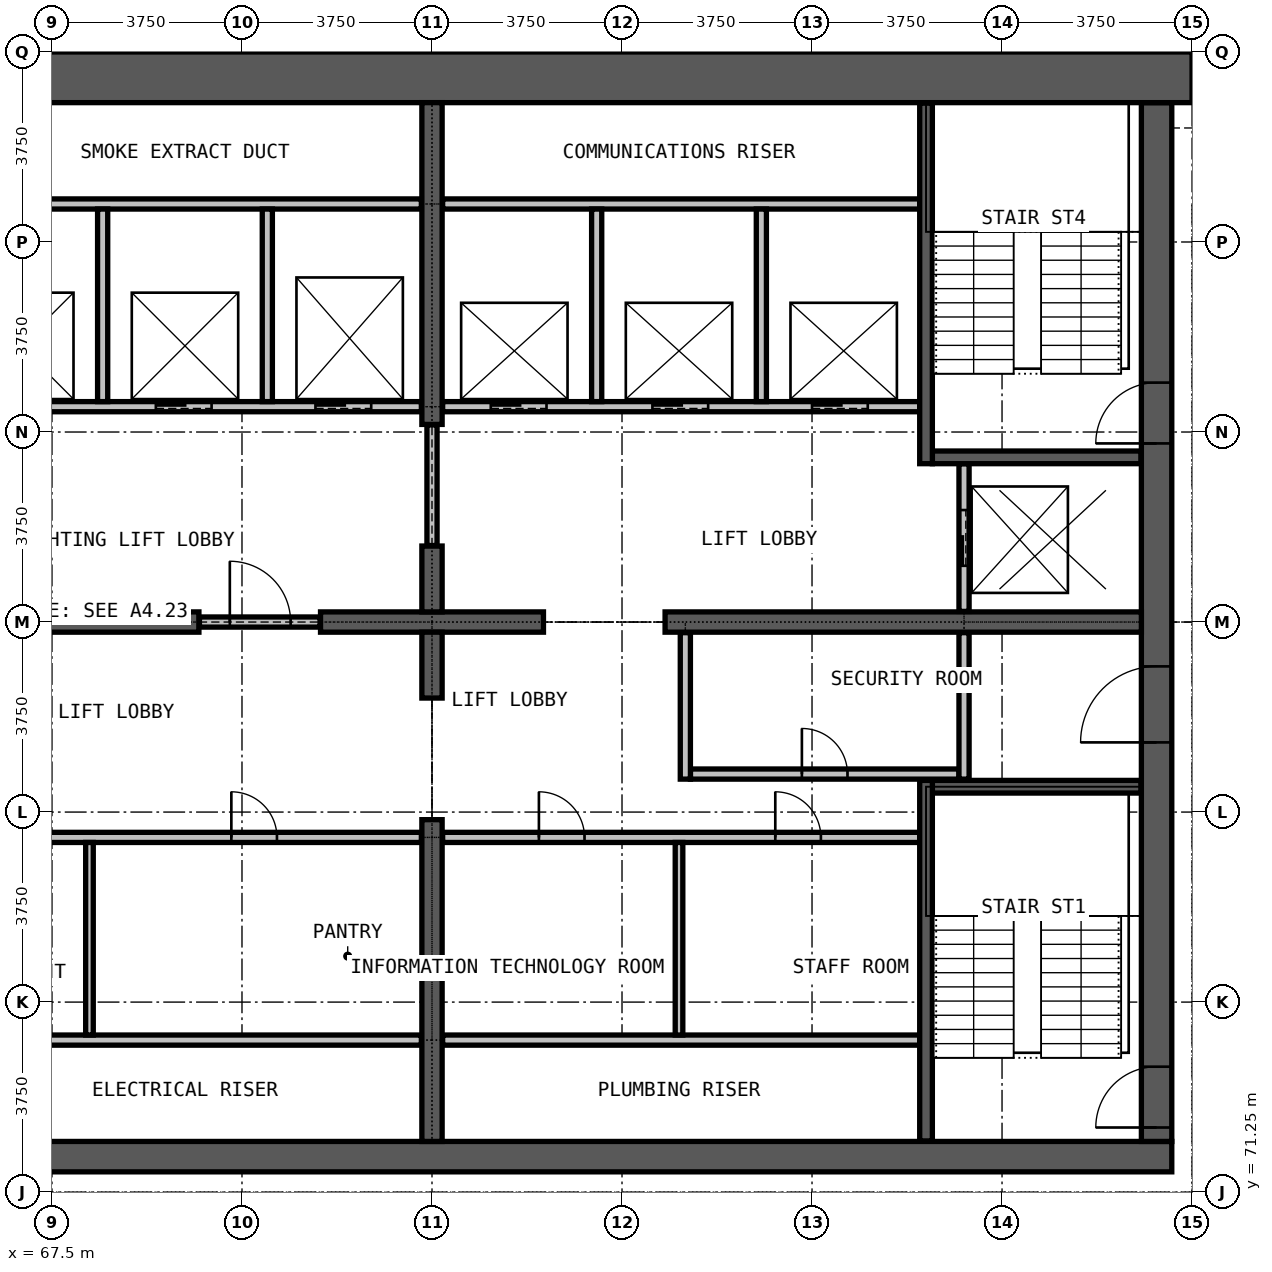
"""IFC4 building model, lengths in metres.
Left out: names, types, materials, properties, quantities, classifications, styles, units other than length and angle.
Written with IfcOpenShell. Run it as: python <this file> out.ifc"""

import sys

from ifc_helpers import new_model, si_unit, direction, frame, frame_2d, origin, place, context, subcontext, project, spatial, rectangle, extrude, element, fill, save


model = new_model("IFC4")
c1 = context("Model", 3, precision=1e-05, world=origin(), true_north=direction((0.0, 1.0)))
c2 = subcontext(c1, "Body", "Model", "MODEL_VIEW")
j1 = project(units=[si_unit("LENGTHUNIT", "METRE"), si_unit("PLANEANGLEUNIT", "RADIAN")], contexts=[c1])
p1 = place(None, origin())
s1 = spatial("IfcSite", under=j1, at=p1, CompositionType="ELEMENT")
p2 = place(p1, origin())
s2 = spatial("IfcBuilding", under=s1, at=p2, CompositionType="ELEMENT")
p3 = place(p2, frame((0.0, 0.0, 249.9)))
s3 = spatial("IfcBuildingStorey", under=s2, at=p3, CompositionType="ELEMENT", Elevation=249.9)
p4 = place(p3, frame((60.4, 71.95, 0.0), z_axis=(0.0, 0.0, 1.0), x_axis=(1.0, 0.0, 0.0)))
e1 = element("IfcWall", 1, at=p4, inside=s3, PredefinedType="SHEAR", context=c2, shape_type="SweptSolid", body=[
    extrude(rectangle(XDim=29.2, YDim=0.6, at=frame_2d((14.6, 0.0))), origin(), (0.0, 0.0, 1.0), 3.6),
])
p5 = place(p3, frame((89.3, 72.25, 0.0), z_axis=(0.0, 0.0, 1.0), x_axis=(0.0, 1.0, 0.0)))
e2 = element("IfcWall", 2, at=p5, inside=s3, PredefinedType="SHEAR", context=c2, shape_type="SweptSolid", body=[
    extrude(rectangle(XDim=20.5, YDim=0.6, at=frame_2d((10.25, 0.0))), origin(), (0.0, 0.0, 1.0), 3.6),
])
p6 = place(p5, frame((0.275, 0.0, 0.0)))
e3 = element("IfcOpeningElement", 3, at=p6, cuts=e2, PredefinedType="OPENING", context=c2, shape_type="SweptSolid", body=[
    extrude(rectangle(XDim=1.2, YDim=2.2, at=frame_2d((0.6, 1.1))), frame((0.0, 0.31, 0.0), z_axis=(0.0, -1.0, 0.0), x_axis=(1.0, 0.0, 0.0)), (0.0, 0.0, 1.0), 0.62),
])
p7 = place(p5, frame((13.775, 0.0, 0.0)))
e4 = element("IfcOpeningElement", 4, at=p7, cuts=e2, PredefinedType="OPENING", context=c2, shape_type="SweptSolid", body=[
    extrude(rectangle(XDim=1.2, YDim=2.2, at=frame_2d((0.6, 1.1))), frame((0.0, 0.31, 0.0), z_axis=(0.0, -1.0, 0.0), x_axis=(1.0, 0.0, 0.0)), (0.0, 0.0, 1.0), 0.62),
])
p8 = place(p5, frame((7.875, 0.0, 0.0)))
e5 = element("IfcOpeningElement", 5, at=p8, cuts=e2, PredefinedType="OPENING", context=c2, shape_type="SweptSolid", body=[
    extrude(rectangle(XDim=1.5, YDim=2.2, at=frame_2d((0.75, 1.1))), frame((0.0, 0.31, 0.0), z_axis=(0.0, -1.0, 0.0), x_axis=(1.0, 0.0, 0.0)), (0.0, 0.0, 1.0), 0.62),
])
p9 = place(p3, frame((90.0, 93.25, 0.0), z_axis=(0.0, 0.0, 1.0), x_axis=(-1.0, 0.0, 0.0)))
e6 = element("IfcWall", 6, at=p9, inside=s3, PredefinedType="SHEAR", context=c2, shape_type="SweptSolid", body=[
    extrude(rectangle(XDim=30.0, YDim=1.0, at=frame_2d((15.0, 0.0))), origin(), (0.0, 0.0, 1.0), 3.6),
])
p10 = place(p3, frame((61.0, 82.5, 0.0), z_axis=(0.0, 0.0, 1.0), x_axis=(1.0, 0.0, 0.0)))
e7 = element("IfcWall", 7, at=p10, inside=s3, PredefinedType="SHEAR", context=c2, shape_type="SweptSolid", body=[
    extrude(rectangle(XDim=9.4, YDim=0.4, at=frame_2d((4.7, 0.0))), origin(), (0.0, 0.0, 1.0), 3.6),
])
p11 = place(p3, frame((72.8, 82.5, 0.0), z_axis=(0.0, 0.0, 1.0), x_axis=(1.0, 0.0, 0.0)))
e8 = element("IfcWall", 8, at=p11, inside=s3, PredefinedType="SHEAR", context=c2, shape_type="SweptSolid", body=[
    extrude(rectangle(XDim=4.4, YDim=0.4, at=frame_2d((2.2, 0.0))), origin(), (0.0, 0.0, 1.0), 3.6),
])
p12 = place(p3, frame((79.6, 82.5, 0.0), z_axis=(0.0, 0.0, 1.0), x_axis=(1.0, 0.0, 0.0)))
e9 = element("IfcWall", 9, at=p12, inside=s3, PredefinedType="SHEAR", context=c2, shape_type="SweptSolid", body=[
    extrude(rectangle(XDim=9.4, YDim=0.4, at=frame_2d((4.7, 0.0))), origin(), (0.0, 0.0, 1.0), 3.6),
])
p13 = place(p3, frame((75.0, 72.25, 0.0), z_axis=(0.0, 0.0, 1.0), x_axis=(0.0, 1.0, 0.0)))
e10 = element("IfcWall", 10, at=p13, inside=s3, PredefinedType="SHEAR", context=c2, shape_type="SweptSolid", body=[
    extrude(rectangle(XDim=6.35, YDim=0.4, at=frame_2d((3.175, 0.0))), origin(), (0.0, 0.0, 1.0), 3.6),
])
for number, where, z_axis, x_axis in (
    (11, (75.0, 81.0, 0.0), (0.0, 0.0, 1.0), (0.0, 1.0, 0.0)),
    (12, (75.0, 82.7, 0.0), (0.0, 0.0, 1.0), (0.0, 1.0, 0.0)),
):
    element("IfcWall", number, at=place(p3, frame(where, z_axis=z_axis, x_axis=x_axis)), inside=s3, PredefinedType="SHEAR", context=c2, shape_type="SweptSolid", body=[
        extrude(rectangle(XDim=1.3, YDim=0.4, at=frame_2d((0.65, 0.0))), origin(), (0.0, 0.0, 1.0), 3.6),
    ])
p14 = place(p3, frame((75.0, 86.4, 0.0), z_axis=(0.0, 0.0, 1.0), x_axis=(0.0, 1.0, 0.0)))
e13 = element("IfcWall", 13, at=p14, inside=s3, PredefinedType="SHEAR", context=c2, shape_type="SweptSolid", body=[
    extrude(rectangle(XDim=6.35, YDim=0.4, at=frame_2d((3.175, 0.0))), origin(), (0.0, 0.0, 1.0), 3.6),
])
for number, where, z_axis, x_axis in (
    (14, (65.375, 74.25, 0.0), (0.0, 0.0, 1.0), (1.0, 0.0, 0.0)),
    (15, (75.21, 74.25, 0.0), (0.0, 0.0, 1.0), (1.0, 0.0, 0.0)),
):
    element("IfcWall", number, at=place(p3, frame(where, z_axis=z_axis, x_axis=x_axis)), inside=s3, PredefinedType="PARTITIONING", context=c2, shape_type="SweptSolid", body=[
        extrude(rectangle(XDim=9.415, YDim=0.2, at=frame_2d((4.708, 0.0))), origin(), (0.0, 0.0, 1.0), 3.25),
    ])
p15 = place(p3, frame((65.375, 78.25, 0.0), z_axis=(0.0, 0.0, 1.0), x_axis=(1.0, 0.0, 0.0)))
e16 = element("IfcWall", 16, at=p15, inside=s3, PredefinedType="PARTITIONING", context=c2, shape_type="SweptSolid", body=[
    extrude(rectangle(XDim=9.415, YDim=0.2, at=frame_2d((4.708, 0.0))), origin(), (0.0, 0.0, 1.0), 3.25),
])
p16 = place(p15, frame((1.0, 0.0, 0.0)))
e17 = element("IfcOpeningElement", 17, at=p16, cuts=e16, PredefinedType="OPENING", context=c2, shape_type="SweptSolid", body=[
    extrude(rectangle(XDim=0.9, YDim=2.2, at=frame_2d((0.45, 1.1))), frame((0.0, 0.11, 0.0), z_axis=(0.0, -1.0, 0.0), x_axis=(1.0, 0.0, 0.0)), (0.0, 0.0, 1.0), 0.22),
])
p17 = place(p15, frame((5.665, 0.0, 0.0)))
e18 = element("IfcOpeningElement", 18, at=p17, cuts=e16, PredefinedType="OPENING", context=c2, shape_type="SweptSolid", body=[
    extrude(rectangle(XDim=0.9, YDim=2.2, at=frame_2d((0.45, 1.1))), frame((0.0, 0.11, 0.0), z_axis=(0.0, -1.0, 0.0), x_axis=(1.0, 0.0, 0.0)), (0.0, 0.0, 1.0), 0.22),
])
p18 = place(p3, frame((75.21, 78.25, 0.0), z_axis=(0.0, 0.0, 1.0), x_axis=(1.0, 0.0, 0.0)))
e19 = element("IfcWall", 19, at=p18, inside=s3, PredefinedType="PARTITIONING", context=c2, shape_type="SweptSolid", body=[
    extrude(rectangle(XDim=9.415, YDim=0.2, at=frame_2d((4.708, 0.0))), origin(), (0.0, 0.0, 1.0), 3.25),
])
p19 = place(p18, frame((1.9, 0.0, 0.0)))
e20 = element("IfcOpeningElement", 20, at=p19, cuts=e19, PredefinedType="OPENING", context=c2, shape_type="SweptSolid", body=[
    extrude(rectangle(XDim=0.9, YDim=2.2, at=frame_2d((0.45, 1.1))), frame((0.0, 0.11, 0.0), z_axis=(0.0, -1.0, 0.0), x_axis=(1.0, 0.0, 0.0)), (0.0, 0.0, 1.0), 0.22),
])
p20 = place(p18, frame((6.565, 0.0, 0.0)))
e21 = element("IfcOpeningElement", 21, at=p20, cuts=e19, PredefinedType="OPENING", context=c2, shape_type="SweptSolid", body=[
    extrude(rectangle(XDim=0.9, YDim=2.2, at=frame_2d((0.45, 1.1))), frame((0.0, 0.11, 0.0), z_axis=(0.0, -1.0, 0.0), x_axis=(1.0, 0.0, 0.0)), (0.0, 0.0, 1.0), 0.22),
])
p21 = place(p3, frame((80.1, 79.5, 0.0), z_axis=(0.0, 0.0, 1.0), x_axis=(1.0, 0.0, 0.0)))
e22 = element("IfcWall", 22, at=p21, inside=s3, PredefinedType="PARTITIONING", context=c2, shape_type="SweptSolid", body=[
    extrude(rectangle(XDim=5.3, YDim=0.2, at=frame_2d((2.65, 0.0))), origin(), (0.0, 0.0, 1.0), 3.25),
])
p22 = place(p21, frame((2.2, 0.0, 0.0)))
e23 = element("IfcOpeningElement", 23, at=p22, cuts=e22, PredefinedType="OPENING", context=c2, shape_type="SweptSolid", body=[
    extrude(rectangle(XDim=0.9, YDim=2.2, at=frame_2d((0.45, 1.1))), frame((0.0, 0.11, 0.0), z_axis=(0.0, -1.0, 0.0), x_axis=(1.0, 0.0, 0.0)), (0.0, 0.0, 1.0), 0.22),
])
p23 = place(p3, frame((70.41, 82.5, 0.0), z_axis=(0.0, 0.0, 1.0), x_axis=(1.0, 0.0, 0.0)))
e24 = element("IfcWall", 24, at=p23, inside=s3, PredefinedType="PARTITIONING", context=c2, shape_type="SweptSolid", body=[
    extrude(rectangle(XDim=2.38, YDim=0.2, at=frame_2d((1.19, 0.0))), origin(), (0.0, 0.0, 1.0), 2.4),
])
p24 = place(p23, frame((0.6, 0.0, 0.0)))
e25 = element("IfcOpeningElement", 25, at=p24, cuts=e24, PredefinedType="OPENING", context=c2, shape_type="SweptSolid", body=[
    extrude(rectangle(XDim=1.2, YDim=2.2, at=frame_2d((0.6, 1.1))), frame((0.0, 0.11, 0.0), z_axis=(0.0, -1.0, 0.0), x_axis=(1.0, 0.0, 0.0)), (0.0, 0.0, 1.0), 0.22),
])
p25 = place(p3, frame((75.0, 84.01, 0.0), z_axis=(0.0, 0.0, 1.0), x_axis=(0.0, 1.0, 0.0)))
e26 = element("IfcWall", 26, at=p25, inside=s3, PredefinedType="PARTITIONING", context=c2, shape_type="SweptSolid", body=[
    extrude(rectangle(XDim=2.38, YDim=0.2, at=frame_2d((1.19, 0.0))), origin(), (0.0, 0.0, 1.0), 2.4),
])
for number, where, z_axis, x_axis in (
    (27, (80.0, 79.4, 0.0), (0.0, 0.0, 1.0), (0.0, 1.0, 0.0)),
    (28, (85.5, 79.4, 0.0), (0.0, 0.0, 1.0), (0.0, 1.0, 0.0)),
):
    element("IfcWall", number, at=place(p3, frame(where, z_axis=z_axis, x_axis=x_axis)), inside=s3, PredefinedType="PARTITIONING", context=c2, shape_type="SweptSolid", body=[
        extrude(rectangle(XDim=2.89, YDim=0.2, at=frame_2d((1.445, 0.0))), origin(), (0.0, 0.0, 1.0), 3.25),
    ])
for number, where, z_axis, x_axis in (
    (29, (68.24, 74.35, 0.0), (0.0, 0.0, 1.0), (0.0, 1.0, 0.0)),
    (30, (79.875, 74.35, 0.0), (0.0, 0.0, 1.0), (0.0, 1.0, 0.0)),
):
    element("IfcWall", number, at=place(p3, frame(where, z_axis=z_axis, x_axis=x_axis)), inside=s3, PredefinedType="PARTITIONING", context=c2, shape_type="SweptSolid", body=[
        extrude(rectangle(XDim=3.8, YDim=0.15, at=frame_2d((1.9, 0.0))), origin(), (0.0, 0.0, 1.0), 3.25),
    ])
p26 = place(p3, frame((65.375, 86.75, 0.0), z_axis=(0.0, 0.0, 1.0), x_axis=(1.0, 0.0, 0.0)))
e31 = element("IfcWall", 31, at=p26, inside=s3, PredefinedType="PARTITIONING", context=c2, shape_type="SweptSolid", body=[
    extrude(rectangle(XDim=9.415, YDim=0.2, at=frame_2d((4.708, 0.0))), origin(), (0.0, 0.0, 1.0), 3.25),
])
p27 = place(p26, frame((1.0, 0.0, 0.0)))
e32 = element("IfcOpeningElement", 32, at=p27, cuts=e31, PredefinedType="OPENING", context=c2, shape_type="SweptSolid", body=[
    extrude(rectangle(XDim=1.1, YDim=2.2, at=frame_2d((0.55, 1.1))), frame((0.0, 0.11, 0.0), z_axis=(0.0, -1.0, 0.0), x_axis=(1.0, 0.0, 0.0)), (0.0, 0.0, 1.0), 0.22),
])
p28 = place(p26, frame((4.175, 0.0, 0.0)))
e33 = element("IfcOpeningElement", 33, at=p28, cuts=e31, PredefinedType="OPENING", context=c2, shape_type="SweptSolid", body=[
    extrude(rectangle(XDim=1.1, YDim=2.2, at=frame_2d((0.55, 1.1))), frame((0.0, 0.11, 0.0), z_axis=(0.0, -1.0, 0.0), x_axis=(1.0, 0.0, 0.0)), (0.0, 0.0, 1.0), 0.22),
])
p29 = place(p26, frame((7.325, 0.0, 0.0)))
e34 = element("IfcOpeningElement", 34, at=p29, cuts=e31, PredefinedType="OPENING", context=c2, shape_type="SweptSolid", body=[
    extrude(rectangle(XDim=1.1, YDim=2.2, at=frame_2d((0.55, 1.1))), frame((0.0, 0.11, 0.0), z_axis=(0.0, -1.0, 0.0), x_axis=(1.0, 0.0, 0.0)), (0.0, 0.0, 1.0), 0.22),
])
p30 = place(p3, frame((75.21, 86.75, 0.0), z_axis=(0.0, 0.0, 1.0), x_axis=(1.0, 0.0, 0.0)))
e35 = element("IfcWall", 35, at=p30, inside=s3, PredefinedType="PARTITIONING", context=c2, shape_type="SweptSolid", body=[
    extrude(rectangle(XDim=9.415, YDim=0.2, at=frame_2d((4.708, 0.0))), origin(), (0.0, 0.0, 1.0), 3.25),
])
p31 = place(p30, frame((0.95, 0.0, 0.0)))
e36 = element("IfcOpeningElement", 36, at=p31, cuts=e35, PredefinedType="OPENING", context=c2, shape_type="SweptSolid", body=[
    extrude(rectangle(XDim=1.1, YDim=2.2, at=frame_2d((0.55, 1.1))), frame((0.0, 0.11, 0.0), z_axis=(0.0, -1.0, 0.0), x_axis=(1.0, 0.0, 0.0)), (0.0, 0.0, 1.0), 0.22),
])
p32 = place(p30, frame((4.14, 0.0, 0.0)))
e37 = element("IfcOpeningElement", 37, at=p32, cuts=e35, PredefinedType="OPENING", context=c2, shape_type="SweptSolid", body=[
    extrude(rectangle(XDim=1.1, YDim=2.2, at=frame_2d((0.55, 1.1))), frame((0.0, 0.11, 0.0), z_axis=(0.0, -1.0, 0.0), x_axis=(1.0, 0.0, 0.0)), (0.0, 0.0, 1.0), 0.22),
])
p33 = place(p30, frame((7.29, 0.0, 0.0)))
e38 = element("IfcOpeningElement", 38, at=p33, cuts=e35, PredefinedType="OPENING", context=c2, shape_type="SweptSolid", body=[
    extrude(rectangle(XDim=1.1, YDim=2.2, at=frame_2d((0.55, 1.1))), frame((0.0, 0.11, 0.0), z_axis=(0.0, -1.0, 0.0), x_axis=(1.0, 0.0, 0.0)), (0.0, 0.0, 1.0), 0.22),
])
for number, where, z_axis, x_axis in (
    (39, (65.375, 90.75, 0.0), (0.0, 0.0, 1.0), (1.0, 0.0, 0.0)),
    (40, (75.21, 90.75, 0.0), (0.0, 0.0, 1.0), (1.0, 0.0, 0.0)),
):
    element("IfcWall", number, at=place(p3, frame(where, z_axis=z_axis, x_axis=x_axis)), inside=s3, PredefinedType="PARTITIONING", context=c2, shape_type="SweptSolid", body=[
        extrude(rectangle(XDim=9.415, YDim=0.2, at=frame_2d((4.708, 0.0))), origin(), (0.0, 0.0, 1.0), 3.25),
    ])
for number, where, z_axis, x_axis in (
    (41, (68.5, 86.85, 0.0), (0.0, 0.0, 1.0), (0.0, 1.0, 0.0)),
    (42, (71.75, 86.85, 0.0), (0.0, 0.0, 1.0), (0.0, 1.0, 0.0)),
    (43, (78.25, 86.85, 0.0), (0.0, 0.0, 1.0), (0.0, 1.0, 0.0)),
    (44, (81.5, 86.85, 0.0), (0.0, 0.0, 1.0), (0.0, 1.0, 0.0)),
):
    element("IfcWall", number, at=place(p3, frame(where, z_axis=z_axis, x_axis=x_axis)), inside=s3, PredefinedType="PARTITIONING", context=c2, shape_type="SweptSolid", body=[
        extrude(rectangle(XDim=3.8, YDim=0.2, at=frame_2d((1.9, 0.0))), origin(), (0.0, 0.0, 1.0), 3.25),
    ])
p34 = place(p3, frame((85.5, 82.71, 0.0), z_axis=(0.0, 0.0, 1.0), x_axis=(0.0, 1.0, 0.0)))
e45 = element("IfcWall", 45, at=p34, inside=s3, PredefinedType="PARTITIONING", context=c2, shape_type="SweptSolid", body=[
    extrude(rectangle(XDim=2.915, YDim=0.2, at=frame_2d((1.458, 0.0))), origin(), (0.0, 0.0, 1.0), 3.25),
])
p35 = place(p34, frame((0.9, 0.0, 0.0)))
e46 = element("IfcOpeningElement", 46, at=p35, cuts=e45, PredefinedType="OPENING", context=c2, shape_type="SweptSolid", body=[
    extrude(rectangle(XDim=1.1, YDim=2.2, at=frame_2d((0.55, 1.1))), frame((0.0, 0.11, 0.0), z_axis=(0.0, -1.0, 0.0), x_axis=(1.0, 0.0, 0.0)), (0.0, 0.0, 1.0), 0.22),
])
for number, where, z_axis, x_axis in (
    (47, (84.875, 79.25, 0.0), (0.0, 0.0, 1.0), (1.0, 0.0, 0.0)),
    (48, (84.875, 85.75, 0.0), (0.0, 0.0, 1.0), (1.0, 0.0, 0.0)),
):
    element("IfcWall", number, at=place(p3, frame(where, z_axis=z_axis, x_axis=x_axis)), inside=s3, PredefinedType="PARTITIONING", context=c2, shape_type="SweptSolid", body=[
        extrude(rectangle(XDim=4.115, YDim=0.25, at=frame_2d((2.058, 0.0))), origin(), (0.0, 0.0, 1.0), 3.25),
    ])
for number, where, z_axis, x_axis in (
    (49, (84.75, 72.26, 0.0), (0.0, 0.0, 1.0), (0.0, 1.0, 0.0)),
    (50, (84.75, 85.625, 0.0), (0.0, 0.0, 1.0), (0.0, 1.0, 0.0)),
):
    element("IfcWall", number, at=place(p3, frame(where, z_axis=z_axis, x_axis=x_axis)), inside=s3, PredefinedType="PARTITIONING", context=c2, shape_type="SweptSolid", body=[
        extrude(rectangle(XDim=7.115, YDim=0.25, at=frame_2d((3.558, 0.0))), origin(), (0.0, 0.0, 1.0), 3.25),
    ])
p36 = place(p31, origin())
e51 = element("IfcDoor", 51, at=p36, inside=s3, OperationType="DOUBLE_DOOR_SLIDING", PredefinedType="DOOR", context=c2, shape_type="SweptSolid", body=[
    extrude(rectangle(XDim=1.1, YDim=2.2, at=frame_2d((0.55, 1.1))), frame((0.0, 0.025, 0.0), z_axis=(0.0, -1.0, 0.0), x_axis=(1.0, 0.0, 0.0)), (0.0, 0.0, 1.0), 0.05),
])
fill(e36, e51)
p37 = place(p32, origin())
e52 = element("IfcDoor", 52, at=p37, inside=s3, OperationType="DOUBLE_DOOR_SLIDING", PredefinedType="DOOR", context=c2, shape_type="SweptSolid", body=[
    extrude(rectangle(XDim=1.1, YDim=2.2, at=frame_2d((0.55, 1.1))), frame((0.0, 0.025, 0.0), z_axis=(0.0, -1.0, 0.0), x_axis=(1.0, 0.0, 0.0)), (0.0, 0.0, 1.0), 0.05),
])
fill(e37, e52)
p38 = place(p33, origin())
e53 = element("IfcDoor", 53, at=p38, inside=s3, OperationType="DOUBLE_DOOR_SLIDING", PredefinedType="DOOR", context=c2, shape_type="SweptSolid", body=[
    extrude(rectangle(XDim=1.1, YDim=2.2, at=frame_2d((0.55, 1.1))), frame((0.0, 0.025, 0.0), z_axis=(0.0, -1.0, 0.0), x_axis=(1.0, 0.0, 0.0)), (0.0, 0.0, 1.0), 0.05),
])
fill(e38, e53)
p39 = place(p28, origin())
e54 = element("IfcDoor", 54, at=p39, inside=s3, OperationType="DOUBLE_DOOR_SLIDING", PredefinedType="DOOR", context=c2, shape_type="SweptSolid", body=[
    extrude(rectangle(XDim=1.1, YDim=2.2, at=frame_2d((0.55, 1.1))), frame((0.0, 0.025, 0.0), z_axis=(0.0, -1.0, 0.0), x_axis=(1.0, 0.0, 0.0)), (0.0, 0.0, 1.0), 0.05),
])
fill(e33, e54)
p40 = place(p29, origin())
e55 = element("IfcDoor", 55, at=p40, inside=s3, OperationType="DOUBLE_DOOR_SLIDING", PredefinedType="DOOR", context=c2, shape_type="SweptSolid", body=[
    extrude(rectangle(XDim=1.1, YDim=2.2, at=frame_2d((0.55, 1.1))), frame((0.0, 0.025, 0.0), z_axis=(0.0, -1.0, 0.0), x_axis=(1.0, 0.0, 0.0)), (0.0, 0.0, 1.0), 0.05),
])
fill(e34, e55)
p41 = place(p35, origin())
e56 = element("IfcDoor", 56, at=p41, inside=s3, OperationType="DOUBLE_DOOR_SLIDING", PredefinedType="DOOR", context=c2, shape_type="SweptSolid", body=[
    extrude(rectangle(XDim=1.1, YDim=2.2, at=frame_2d((0.55, 1.1))), frame((0.0, 0.025, 0.0), z_axis=(0.0, -1.0, 0.0), x_axis=(1.0, 0.0, 0.0)), (0.0, 0.0, 1.0), 0.05),
])
fill(e46, e56)
p42 = place(p24, origin())
e57 = element("IfcDoor", 57, at=p42, inside=s3, OperationType="SINGLE_SWING_LEFT", PredefinedType="DOOR", context=c2, shape_type="SweptSolid", body=[
    extrude(rectangle(XDim=1.2, YDim=2.2, at=frame_2d((0.6, 1.1))), frame((0.0, 0.025, 0.0), z_axis=(0.0, -1.0, 0.0), x_axis=(1.0, 0.0, 0.0)), (0.0, 0.0, 1.0), 0.05),
])
fill(e25, e57)
p43 = place(p6, origin())
e58 = element("IfcDoor", 58, at=p43, inside=s3, OperationType="SINGLE_SWING_RIGHT", PredefinedType="DOOR", context=c2, shape_type="SweptSolid", body=[
    extrude(rectangle(XDim=1.2, YDim=2.2, at=frame_2d((0.6, 1.1))), frame((0.0, 0.025, 0.0), z_axis=(0.0, -1.0, 0.0), x_axis=(1.0, 0.0, 0.0)), (0.0, 0.0, 1.0), 0.05),
])
fill(e3, e58)
p44 = place(p7, origin())
e59 = element("IfcDoor", 59, at=p44, inside=s3, OperationType="SINGLE_SWING_LEFT", PredefinedType="DOOR", context=c2, shape_type="SweptSolid", body=[
    extrude(rectangle(XDim=1.2, YDim=2.2, at=frame_2d((0.6, 1.1))), frame((0.0, 0.025, 0.0), z_axis=(0.0, -1.0, 0.0), x_axis=(1.0, 0.0, 0.0)), (0.0, 0.0, 1.0), 0.05),
])
fill(e4, e59)
p45 = place(p8, origin())
e60 = element("IfcDoor", 60, at=p45, inside=s3, OperationType="DOUBLE_DOOR_SINGLE_SWING", PredefinedType="DOOR", context=c2, shape_type="SweptSolid", body=[
    extrude(rectangle(XDim=1.5, YDim=2.2, at=frame_2d((0.75, 1.1))), frame((0.0, 0.025, 0.0), z_axis=(0.0, -1.0, 0.0), x_axis=(1.0, 0.0, 0.0)), (0.0, 0.0, 1.0), 0.05),
])
fill(e5, e60)
p46 = place(p22, origin())
e61 = element("IfcDoor", 61, at=p46, inside=s3, OperationType="SINGLE_SWING_RIGHT", PredefinedType="DOOR", context=c2, shape_type="SweptSolid", body=[
    extrude(rectangle(XDim=0.9, YDim=2.2, at=frame_2d((0.45, 1.1))), frame((0.0, 0.025, 0.0), z_axis=(0.0, -1.0, 0.0), x_axis=(1.0, 0.0, 0.0)), (0.0, 0.0, 1.0), 0.05),
])
fill(e23, e61)
p47 = place(p17, origin())
e62 = element("IfcDoor", 62, at=p47, inside=s3, OperationType="SINGLE_SWING_RIGHT", PredefinedType="DOOR", context=c2, shape_type="SweptSolid", body=[
    extrude(rectangle(XDim=0.9, YDim=2.2, at=frame_2d((0.45, 1.1))), frame((0.0, 0.025, 0.0), z_axis=(0.0, -1.0, 0.0), x_axis=(1.0, 0.0, 0.0)), (0.0, 0.0, 1.0), 0.05),
])
fill(e18, e62)
p48 = place(p19, origin())
e63 = element("IfcDoor", 63, at=p48, inside=s3, OperationType="SINGLE_SWING_LEFT", PredefinedType="DOOR", context=c2, shape_type="SweptSolid", body=[
    extrude(rectangle(XDim=0.9, YDim=2.2, at=frame_2d((0.45, 1.1))), frame((0.0, 0.025, 0.0), z_axis=(0.0, -1.0, 0.0), x_axis=(1.0, 0.0, 0.0)), (0.0, 0.0, 1.0), 0.05),
])
fill(e20, e63)
p49 = place(p20, origin())
e64 = element("IfcDoor", 64, at=p49, inside=s3, OperationType="SINGLE_SWING_RIGHT", PredefinedType="DOOR", context=c2, shape_type="SweptSolid", body=[
    extrude(rectangle(XDim=0.9, YDim=2.2, at=frame_2d((0.45, 1.1))), frame((0.0, 0.025, 0.0), z_axis=(0.0, -1.0, 0.0), x_axis=(1.0, 0.0, 0.0)), (0.0, 0.0, 1.0), 0.05),
])
fill(e21, e64)
save(model, sys.argv[1])
